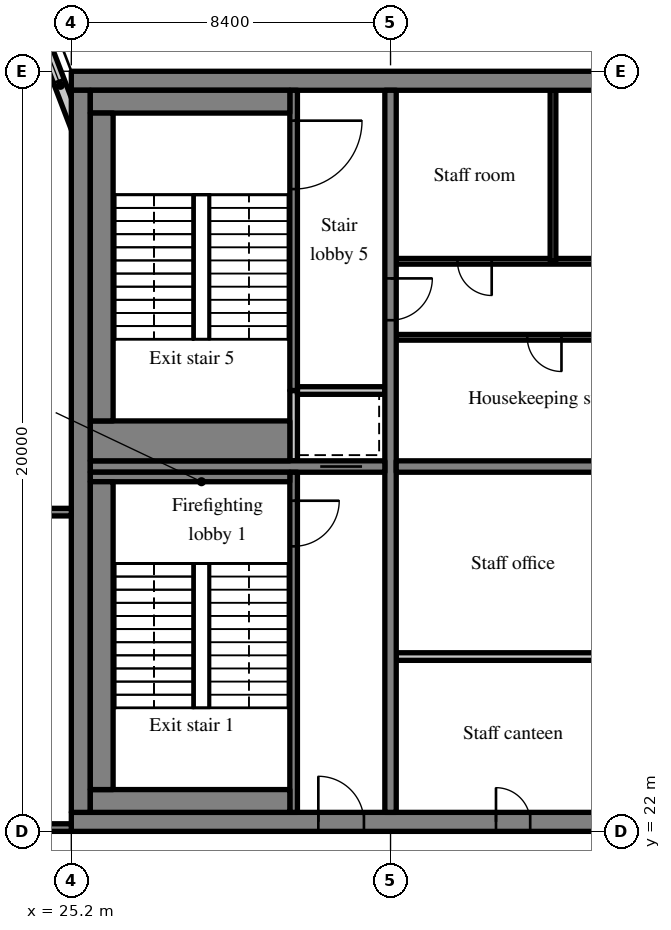
"""IFC4 building model, lengths in metres.
Left out: names, types, materials, properties, quantities, classifications, styles, units other than length and angle.
Written with IfcOpenShell. Run it as: python <this file> out.ifc"""

import sys

from ifc_helpers import new_model, si_unit, direction, frame, frame_2d, origin, place, context, subcontext, project, spatial, rectangle, extrude, source, transform, mapped, element, fill, save


model = new_model("IFC4")
c1 = context("Model", 3, precision=1e-05, world=origin(), true_north=direction((0.0, 1.0)))
c2 = subcontext(c1, "Body", "Model", "MODEL_VIEW")
j1 = project(units=[si_unit("LENGTHUNIT", "METRE"), si_unit("PLANEANGLEUNIT", "RADIAN")], contexts=[c1])
p1 = place(None, origin())
s1 = spatial("IfcSite", under=j1, at=p1, CompositionType="ELEMENT")
p2 = place(p1, origin())
s2 = spatial("IfcBuilding", under=s1, at=p2, CompositionType="ELEMENT")
p3 = place(p2, frame((0.0, 0.0, 301.7)))
s3 = spatial("IfcBuildingStorey", under=s2, at=p3, CompositionType="ELEMENT", Elevation=301.7)
m1 = source(origin(), c2, "Body", "SweptSolid", [
    extrude(rectangle(XDim=50.4, YDim=0.5, at=frame_2d((25.2, 0.0))), origin(), (0.0, 0.0, 1.0), 3.72),
])
p4 = place(p3, frame((25.2, 22.25, 0.0), z_axis=(0.0, 0.0, 1.0), x_axis=(1.0, 0.0, 0.0)))
e1 = element("IfcWall", 1, at=p4, inside=s3, PredefinedType="SHEAR", context=c2, shape_type="MappedRepresentation", body=[
    mapped(m1, transform((0.0, 0.0, 0.0), scale=1.0)),
])
m2 = source(origin(), c2, "Body", "SweptSolid", [
    extrude(rectangle(XDim=1.8, YDim=2.1, at=frame_2d((0.9, 1.05))), frame((0.0, 0.26, 0.0), z_axis=(0.0, -1.0, 0.0), x_axis=(1.0, 0.0, 0.0)), (0.0, 0.0, 1.0), 0.52),
])
p5 = place(p4, frame((15.9, 0.0, 0.0)))
e2 = element("IfcOpeningElement", 2, at=p5, cuts=e1, PredefinedType="OPENING", context=c2, shape_type="MappedRepresentation", body=[
    mapped(m2, transform((0.0, 0.0, 0.0), scale=1.0)),
])
m3 = source(origin(), c2, "Body", "SweptSolid", [
    extrude(rectangle(XDim=0.9, YDim=2.1, at=frame_2d((0.45, 1.05))), frame((0.0, 0.26, 0.0), z_axis=(0.0, -1.0, 0.0), x_axis=(1.0, 0.0, 0.0)), (0.0, 0.0, 1.0), 0.52),
])
p6 = place(p4, frame((11.175, 0.0, 0.0)))
e3 = element("IfcOpeningElement", 3, at=p6, cuts=e1, PredefinedType="OPENING", context=c2, shape_type="MappedRepresentation", body=[
    mapped(m3, transform((0.0, 0.0, 0.0), scale=1.0)),
])
p7 = place(p4, frame((21.525, 0.0, 0.0)))
e4 = element("IfcOpeningElement", 4, at=p7, cuts=e1, PredefinedType="OPENING", context=c2, shape_type="MappedRepresentation", body=[
    mapped(m3, transform((0.0, 0.0, 0.0), scale=1.0)),
])
p8 = place(p4, frame((32.7, 0.0, 0.0)))
e5 = element("IfcOpeningElement", 5, at=p8, cuts=e1, PredefinedType="OPENING", context=c2, shape_type="MappedRepresentation", body=[
    mapped(m2, transform((0.0, 0.0, 0.0), scale=1.0)),
])
m4 = source(origin(), c2, "Body", "SweptSolid", [
    extrude(rectangle(XDim=1.2, YDim=2.1, at=frame_2d((0.6, 1.05))), frame((0.0, 0.26, 0.0), z_axis=(0.0, -1.0, 0.0), x_axis=(1.0, 0.0, 0.0)), (0.0, 0.0, 1.0), 0.52),
])
p9 = place(p4, frame((6.5, 0.0, 0.0)))
e6 = element("IfcOpeningElement", 6, at=p9, cuts=e1, PredefinedType="OPENING", context=c2, shape_type="MappedRepresentation", body=[
    mapped(m4, transform((0.0, 0.0, 0.0), scale=1.0)),
])
p10 = place(p4, frame((47.975, 0.0, 0.0)))
e7 = element("IfcOpeningElement", 7, at=p10, cuts=e1, PredefinedType="OPENING", context=c2, shape_type="MappedRepresentation", body=[
    mapped(m4, transform((0.0, 0.0, 0.0), scale=1.0)),
])
p11 = place(p3, frame((25.2, 41.75, 0.0), z_axis=(0.0, 0.0, 1.0), x_axis=(1.0, 0.0, 0.0)))
e8 = element("IfcWall", 8, at=p11, inside=s3, PredefinedType="SHEAR", context=c2, shape_type="MappedRepresentation", body=[
    mapped(m1, transform((0.0, 0.0, 0.0), scale=1.0)),
])
m5 = source(origin(), c2, "Body", "SweptSolid", [
    extrude(rectangle(XDim=19.0, YDim=0.5, at=frame_2d((9.5, 0.0))), origin(), (0.0, 0.0, 1.0), 3.72),
])
p12 = place(p3, frame((25.45, 22.5, 0.0), z_axis=(0.0, 0.0, 1.0), x_axis=(0.0, 1.0, 0.0)))
e9 = element("IfcWall", 9, at=p12, inside=s3, PredefinedType="SHEAR", context=c2, shape_type="MappedRepresentation", body=[
    mapped(m5, transform((0.0, 0.0, 0.0), scale=1.0)),
])
m6 = source(origin(), c2, "Body", "SweptSolid", [
    extrude(rectangle(XDim=19.0, YDim=0.3, at=frame_2d((9.5, 0.0))), origin(), (0.0, 0.0, 1.0), 3.72),
])
p13 = place(p3, frame((33.6, 22.5, 0.0), z_axis=(0.0, 0.0, 1.0), x_axis=(0.0, 1.0, 0.0)))
e10 = element("IfcWall", 10, at=p13, inside=s3, PredefinedType="SHEAR", context=c2, shape_type="MappedRepresentation", body=[
    mapped(m6, transform((0.0, 0.0, 0.0), scale=1.0)),
])
m7 = source(origin(), c2, "Body", "SweptSolid", [
    extrude(rectangle(XDim=1.1, YDim=2.1, at=frame_2d((0.55, 1.05))), frame((0.0, 0.16, 0.0), z_axis=(0.0, -1.0, 0.0), x_axis=(1.0, 0.0, 0.0)), (0.0, 0.0, 1.0), 0.32),
])
p14 = place(p13, frame((12.95, 0.0, 0.0)))
e11 = element("IfcOpeningElement", 11, at=p14, cuts=e10, PredefinedType="OPENING", context=c2, shape_type="MappedRepresentation", body=[
    mapped(m7, transform((0.0, 0.0, 0.0), scale=1.0)),
])
m8 = source(origin(), c2, "Body", "SweptSolid", [
    extrude(rectangle(XDim=7.75, YDim=0.3, at=frame_2d((3.875, 0.0))), origin(), (0.0, 0.0, 1.0), 3.72),
])
p15 = place(p3, frame((25.7, 31.6, 0.0), z_axis=(0.0, 0.0, 1.0), x_axis=(1.0, 0.0, 0.0)))
e12 = element("IfcWall", 12, at=p15, inside=s3, PredefinedType="SHEAR", context=c2, shape_type="MappedRepresentation", body=[
    mapped(m8, transform((0.0, 0.0, 0.0), scale=1.0)),
])
p16 = place(p15, frame((6.05, 0.0, 0.0)))
e13 = element("IfcOpeningElement", 13, at=p16, cuts=e12, PredefinedType="OPENING", context=c2, shape_type="MappedRepresentation", body=[
    mapped(m7, transform((0.0, 0.0, 0.0), scale=1.0)),
])
m9 = source(origin(), c2, "Body", "SweptSolid", [
    extrude(rectangle(XDim=16.5, YDim=0.3, at=frame_2d((8.25, 0.0))), origin(), (0.0, 0.0, 1.0), 3.72),
])
p17 = place(p3, frame((33.75, 31.6, 0.0), z_axis=(0.0, 0.0, 1.0), x_axis=(1.0, 0.0, 0.0)))
e14 = element("IfcWall", 14, at=p17, inside=s3, PredefinedType="SHEAR", context=c2, shape_type="MappedRepresentation", body=[
    mapped(m9, transform((0.0, 0.0, 0.0), scale=1.0)),
])
m10 = source(origin(), c2, "Body", "SweptSolid", [
    extrude(rectangle(XDim=1.0, YDim=2.1, at=frame_2d((0.5, 1.05))), frame((0.0, 0.16, 0.0), z_axis=(0.0, -1.0, 0.0), x_axis=(1.0, 0.0, 0.0)), (0.0, 0.0, 1.0), 0.32),
])
p18 = place(p17, frame((14.875, 0.0, 0.0)))
e15 = element("IfcOpeningElement", 15, at=p18, cuts=e14, PredefinedType="OPENING", context=c2, shape_type="MappedRepresentation", body=[
    mapped(m10, transform((0.0, 0.0, 0.0), scale=1.0)),
])
m11 = source(origin(), c2, "Body", "SweptSolid", [
    extrude(rectangle(XDim=3.559, YDim=0.3, at=frame_2d((1.78, 0.0))), origin(), (0.0, 0.0, 1.0), 3.72),
])
p19 = place(p3, frame((25.55, 39.969, 0.0), z_axis=(0.0, 0.0, 1.0), x_axis=(-0.35779745313, 0.933799219604, 0.0)))
e16 = element("IfcWall", 16, at=p19, inside=s3, PredefinedType="SOLIDWALL", context=c2, shape_type="MappedRepresentation", body=[
    mapped(m11, transform((0.0, 0.0, 0.0), scale=1.0)),
])
m12 = source(origin(), c2, "Body", "SweptSolid", [
    extrude(rectangle(XDim=1.5, YDim=2.0, at=frame_2d((0.75, 1.0))), frame((0.0, 0.16, 0.0), z_axis=(0.0, -1.0, 0.0), x_axis=(1.0, 0.0, 0.0)), (0.0, 0.0, 1.0), 0.32),
])
p20 = place(p19, frame((1.903, 0.0, 0.9)))
e17 = element("IfcOpeningElement", 17, at=p20, cuts=e16, PredefinedType="OPENING", context=c2, shape_type="MappedRepresentation", body=[
    mapped(m12, transform((0.0, 0.0, 0.0), scale=1.0)),
])
m13 = source(origin(), c2, "Body", "SweptSolid", [
    extrude(rectangle(XDim=6.15, YDim=0.2, at=frame_2d((3.075, 0.0))), origin(), (0.0, 0.0, 1.0), 3.72),
])
p21 = place(p3, frame((33.75, 26.6, 0.0), z_axis=(0.0, 0.0, 1.0), x_axis=(1.0, 0.0, 0.0)))
e18 = element("IfcWall", 18, at=p21, inside=s3, PredefinedType="PARTITIONING", context=c2, shape_type="MappedRepresentation", body=[
    mapped(m13, transform((0.0, 0.0, 0.0), scale=1.0)),
])
m14 = source(origin(), c2, "Body", "SweptSolid", [
    extrude(rectangle(XDim=14.25, YDim=0.15, at=frame_2d((7.125, 0.0))), origin(), (0.0, 0.0, 1.0), 3.72),
])
p22 = place(p3, frame((33.75, 35.0, 0.0), z_axis=(0.0, 0.0, 1.0), x_axis=(1.0, 0.0, 0.0)))
e19 = element("IfcWall", 19, at=p22, inside=s3, PredefinedType="PARTITIONING", context=c2, shape_type="MappedRepresentation", body=[
    mapped(m14, transform((0.0, 0.0, 0.0), scale=1.0)),
])
m15 = source(origin(), c2, "Body", "SweptSolid", [
    extrude(rectangle(XDim=0.9, YDim=2.1, at=frame_2d((0.45, 1.05))), frame((0.0, 0.085, 0.0), z_axis=(0.0, -1.0, 0.0), x_axis=(1.0, 0.0, 0.0)), (0.0, 0.0, 1.0), 0.17),
])
p23 = place(p22, frame((3.448, 0.0, 0.0)))
e20 = element("IfcOpeningElement", 20, at=p23, cuts=e19, PredefinedType="OPENING", context=c2, shape_type="MappedRepresentation", body=[
    mapped(m15, transform((0.0, 0.0, 0.0), scale=1.0)),
])
p24 = place(p22, frame((10.536, 0.0, 0.0)))
e21 = element("IfcOpeningElement", 21, at=p24, cuts=e19, PredefinedType="OPENING", context=c2, shape_type="MappedRepresentation", body=[
    mapped(m15, transform((0.0, 0.0, 0.0), scale=1.0)),
])
m16 = source(origin(), c2, "Body", "SweptSolid", [
    extrude(rectangle(XDim=16.5, YDim=0.15, at=frame_2d((8.25, 0.0))), origin(), (0.0, 0.0, 1.0), 3.72),
])
p25 = place(p3, frame((33.75, 37.0, 0.0), z_axis=(0.0, 0.0, 1.0), x_axis=(1.0, 0.0, 0.0)))
e22 = element("IfcWall", 22, at=p25, inside=s3, PredefinedType="PARTITIONING", context=c2, shape_type="MappedRepresentation", body=[
    mapped(m16, transform((0.0, 0.0, 0.0), scale=1.0)),
])
p26 = place(p25, frame((1.612, 0.0, 0.0)))
e23 = element("IfcOpeningElement", 23, at=p26, cuts=e22, PredefinedType="OPENING", context=c2, shape_type="MappedRepresentation", body=[
    mapped(m15, transform((0.0, 0.0, 0.0), scale=1.0)),
])
p27 = place(p25, frame((7.387, 0.0, 0.0)))
e24 = element("IfcOpeningElement", 24, at=p27, cuts=e22, PredefinedType="OPENING", context=c2, shape_type="MappedRepresentation", body=[
    mapped(m15, transform((0.0, 0.0, 0.0), scale=1.0)),
])
p28 = place(p25, frame((12.337, 0.0, 0.0)))
e25 = element("IfcOpeningElement", 25, at=p28, cuts=e22, PredefinedType="OPENING", context=c2, shape_type="MappedRepresentation", body=[
    mapped(m15, transform((0.0, 0.0, 0.0), scale=1.0)),
])
p29 = place(p25, frame((14.813, 0.0, 0.0)))
e26 = element("IfcOpeningElement", 26, at=p29, cuts=e22, PredefinedType="OPENING", context=c2, shape_type="MappedRepresentation", body=[
    mapped(m15, transform((0.0, 0.0, 0.0), scale=1.0)),
])
m17 = source(origin(), c2, "Body", "SweptSolid", [
    extrude(rectangle(XDim=4.5, YDim=0.15, at=frame_2d((2.25, 0.0))), origin(), (0.0, 0.0, 1.0), 3.72),
])
p30 = place(p3, frame((37.875, 37.0, 0.0), z_axis=(0.0, 0.0, 1.0), x_axis=(0.0, 1.0, 0.0)))
e27 = element("IfcWall", 27, at=p30, inside=s3, PredefinedType="PARTITIONING", context=c2, shape_type="MappedRepresentation", body=[
    mapped(m17, transform((0.0, 0.0, 0.0), scale=1.0)),
])
m18 = source(origin(), c2, "Body", "SweptSolid", [
    extrude(rectangle(XDim=8.95, YDim=0.2, at=frame_2d((4.475, 0.0))), origin(), (0.0, 0.0, 1.0), 3.72),
])
p31 = place(p3, frame((31.05, 22.5, 0.0), z_axis=(0.0, 0.0, 1.0), x_axis=(0.0, 1.0, 0.0)))
e28 = element("IfcWall", 28, at=p31, inside=s3, PredefinedType="SOLIDWALL", context=c2, shape_type="MappedRepresentation", body=[
    mapped(m18, transform((0.0, 0.0, 0.0), scale=1.0)),
])
m19 = source(origin(), c2, "Body", "SweptSolid", [
    extrude(rectangle(XDim=1.2, YDim=2.1, at=frame_2d((0.6, 1.05))), frame((0.0, 0.11, 0.0), z_axis=(0.0, -1.0, 0.0), x_axis=(1.0, 0.0, 0.0)), (0.0, 0.0, 1.0), 0.22),
])
p32 = place(p31, frame((7.0, 0.0, 0.0)))
e29 = element("IfcOpeningElement", 29, at=p32, cuts=e28, PredefinedType="OPENING", context=c2, shape_type="MappedRepresentation", body=[
    mapped(m19, transform((0.0, 0.0, 0.0), scale=1.0)),
])
m20 = source(origin(), c2, "Body", "SweptSolid", [
    extrude(rectangle(XDim=1.85, YDim=0.2, at=frame_2d((0.925, 0.0))), origin(), (0.0, 0.0, 1.0), 3.72),
])
p33 = place(p3, frame((31.05, 31.75, 0.0), z_axis=(0.0, 0.0, 1.0), x_axis=(0.0, 1.0, 0.0)))
e30 = element("IfcWall", 30, at=p33, inside=s3, PredefinedType="SOLIDWALL", context=c2, shape_type="MappedRepresentation", body=[
    mapped(m20, transform((0.0, 0.0, 0.0), scale=1.0)),
])
m21 = source(origin(), c2, "Body", "SweptSolid", [
    extrude(rectangle(XDim=2.3, YDim=0.2, at=frame_2d((1.15, 0.0))), origin(), (0.0, 0.0, 1.0), 3.72),
])
p34 = place(p3, frame((31.15, 33.6, 0.0), z_axis=(0.0, 0.0, 1.0), x_axis=(1.0, 0.0, 0.0)))
e31 = element("IfcWall", 31, at=p34, inside=s3, PredefinedType="SOLIDWALL", context=c2, shape_type="MappedRepresentation", body=[
    mapped(m21, transform((0.0, 0.0, 0.0), scale=1.0)),
])
m22 = source(origin(), c2, "Body", "SweptSolid", [
    extrude(rectangle(XDim=7.9, YDim=0.2, at=frame_2d((3.95, 0.0))), origin(), (0.0, 0.0, 1.0), 3.72),
])
p35 = place(p3, frame((31.05, 33.6, 0.0), z_axis=(0.0, 0.0, 1.0), x_axis=(0.0, 1.0, 0.0)))
e32 = element("IfcWall", 32, at=p35, inside=s3, PredefinedType="SOLIDWALL", context=c2, shape_type="MappedRepresentation", body=[
    mapped(m22, transform((0.0, 0.0, 0.0), scale=1.0)),
])
m23 = source(origin(), c2, "Body", "SweptSolid", [
    extrude(rectangle(XDim=1.8, YDim=2.1, at=frame_2d((0.9, 1.05))), frame((0.0, 0.11, 0.0), z_axis=(0.0, -1.0, 0.0), x_axis=(1.0, 0.0, 0.0)), (0.0, 0.0, 1.0), 0.22),
])
p36 = place(p35, frame((5.3, 0.0, 0.0)))
e33 = element("IfcOpeningElement", 33, at=p36, cuts=e32, PredefinedType="OPENING", context=c2, shape_type="MappedRepresentation", body=[
    mapped(m23, transform((0.0, 0.0, 0.0), scale=1.0)),
])
m24 = source(origin(), c2, "Body", "SweptSolid", [
    extrude(rectangle(XDim=8.15, YDim=0.2, at=frame_2d((4.075, 0.0))), origin(), (0.0, 0.0, 1.0), 3.72),
])
p37 = place(p3, frame((17.05, 22.1, 0.0), z_axis=(0.0, 0.0, 1.0), x_axis=(1.0, 0.0, 0.0)))
e34 = element("IfcWall", 34, at=p37, inside=s3, PredefinedType="SOLIDWALL", context=c2, shape_type="MappedRepresentation", body=[
    mapped(m24, transform((0.0, 0.0, 0.0), scale=1.0)),
])
p38 = place(p37, frame((5.95, 0.0, 0.0)))
e35 = element("IfcOpeningElement", 35, at=p38, cuts=e34, PredefinedType="OPENING", context=c2, shape_type="MappedRepresentation", body=[
    mapped(m19, transform((0.0, 0.0, 0.0), scale=1.0)),
])
p39 = place(p3, frame((17.05, 30.4, 0.0), z_axis=(0.0, 0.0, 1.0), x_axis=(1.0, 0.0, 0.0)))
e36 = element("IfcWall", 36, at=p39, inside=s3, PredefinedType="SOLIDWALL", context=c2, shape_type="MappedRepresentation", body=[
    mapped(m24, transform((0.0, 0.0, 0.0), scale=1.0)),
])
m25 = source(origin(), c2, "Body", "SweptSolid", [
    extrude(rectangle(XDim=1.0, YDim=2.1, at=frame_2d((0.5, 1.05))), frame((0.0, 0.11, 0.0), z_axis=(0.0, -1.0, 0.0), x_axis=(1.0, 0.0, 0.0)), (0.0, 0.0, 1.0), 0.22),
])
p40 = place(p39, frame((6.05, 0.0, 0.0)))
e37 = element("IfcOpeningElement", 37, at=p40, cuts=e36, PredefinedType="OPENING", context=c2, shape_type="MappedRepresentation", body=[
    mapped(m25, transform((0.0, 0.0, 0.0), scale=1.0)),
])
m26 = source(origin(), c2, "Body", "SweptSolid", [
    extrude(rectangle(XDim=5.25, YDim=0.6, at=frame_2d((2.625, 0.0))), origin(), (0.0, 0.0, 1.0), 3.72),
])
p41 = place(p3, frame((25.7, 22.8, 0.0), z_axis=(0.0, 0.0, 1.0), x_axis=(1.0, 0.0, 0.0)))
e38 = element("IfcWall", 38, at=p41, inside=s3, PredefinedType="SOLIDWALL", context=c2, shape_type="MappedRepresentation", body=[
    mapped(m26, transform((0.0, 0.0, 0.0), scale=1.0)),
])
m27 = source(origin(), c2, "Body", "SweptSolid", [
    extrude(rectangle(XDim=5.25, YDim=0.25, at=frame_2d((2.625, 0.0))), origin(), (0.0, 0.0, 1.0), 3.72),
])
p42 = place(p3, frame((25.7, 31.325, 0.0), z_axis=(0.0, 0.0, 1.0), x_axis=(1.0, 0.0, 0.0)))
e39 = element("IfcWall", 39, at=p42, inside=s3, PredefinedType="SOLIDWALL", context=c2, shape_type="MappedRepresentation", body=[
    mapped(m27, transform((0.0, 0.0, 0.0), scale=1.0)),
])
m28 = source(origin(), c2, "Body", "SweptSolid", [
    extrude(rectangle(XDim=8.1, YDim=0.6, at=frame_2d((4.05, 0.0))), origin(), (0.0, 0.0, 1.0), 3.72),
])
p43 = place(p3, frame((26.0, 23.1, 0.0), z_axis=(0.0, 0.0, 1.0), x_axis=(0.0, 1.0, 0.0)))
e40 = element("IfcWall", 40, at=p43, inside=s3, PredefinedType="SOLIDWALL", context=c2, shape_type="MappedRepresentation", body=[
    mapped(m28, transform((0.0, 0.0, 0.0), scale=1.0)),
])
p44 = place(p3, frame((25.7, 41.2, 0.0), z_axis=(0.0, 0.0, 1.0), x_axis=(1.0, 0.0, 0.0)))
e41 = element("IfcWall", 41, at=p44, inside=s3, PredefinedType="SOLIDWALL", context=c2, shape_type="MappedRepresentation", body=[
    mapped(m26, transform((0.0, 0.0, 0.0), scale=1.0)),
])
m29 = source(origin(), c2, "Body", "SweptSolid", [
    extrude(rectangle(XDim=5.25, YDim=1.05, at=frame_2d((2.625, 0.0))), origin(), (0.0, 0.0, 1.0), 3.72),
])
p45 = place(p3, frame((25.7, 32.275, 0.0), z_axis=(0.0, 0.0, 1.0), x_axis=(1.0, 0.0, 0.0)))
e42 = element("IfcWall", 42, at=p45, inside=s3, PredefinedType="SOLIDWALL", context=c2, shape_type="MappedRepresentation", body=[
    mapped(m29, transform((0.0, 0.0, 0.0), scale=1.0)),
])
p46 = place(p3, frame((26.0, 32.8, 0.0), z_axis=(0.0, 0.0, 1.0), x_axis=(0.0, 1.0, 0.0)))
e43 = element("IfcWall", 43, at=p46, inside=s3, PredefinedType="SOLIDWALL", context=c2, shape_type="MappedRepresentation", body=[
    mapped(m28, transform((0.0, 0.0, 0.0), scale=1.0)),
])
m30 = source(origin(), c2, "Body", "SweptSolid", [
    extrude(rectangle(XDim=1.5, YDim=2.0, at=frame_2d((0.75, 1.0))), frame((0.0, 0.03, 0.0), z_axis=(0.0, -1.0, 0.0), x_axis=(1.0, 0.0, 0.0)), (0.0, 0.0, 1.0), 0.06),
])
p47 = place(p20, origin())
e44 = element("IfcWindow", 44, at=p47, inside=s3, PartitioningType="SINGLE_PANEL", PredefinedType="WINDOW", context=c2, shape_type="MappedRepresentation", body=[
    mapped(m30, transform((0.0, 0.0, 0.0), scale=1.0)),
])
fill(e17, e44)
m31 = source(origin(), c2, "Body", "SweptSolid", [
    extrude(rectangle(XDim=0.9, YDim=2.1, at=frame_2d((0.45, 1.05))), frame((0.0, 0.175, 0.0), z_axis=(0.0, -1.0, 0.0), x_axis=(1.0, 0.0, 0.0)), (0.0, 0.0, 1.0), 0.05),
])
p48 = place(p6, origin())
e45 = element("IfcDoor", 45, at=p48, inside=s3, OperationType="SINGLE_SWING_LEFT", PredefinedType="DOOR", context=c2, shape_type="MappedRepresentation", body=[
    mapped(m31, transform((0.0, 0.0, 0.0), scale=1.0)),
])
fill(e3, e45)
m32 = source(origin(), c2, "Body", "SweptSolid", [
    extrude(rectangle(XDim=0.9, YDim=2.1, at=frame_2d((0.45, 1.05))), frame((0.0, 0.025, 0.0), z_axis=(0.0, -1.0, 0.0), x_axis=(1.0, 0.0, 0.0)), (0.0, 0.0, 1.0), 0.05),
])
p49 = place(p23, origin())
e46 = element("IfcDoor", 46, at=p49, inside=s3, OperationType="SINGLE_SWING_RIGHT", PredefinedType="DOOR", context=c2, shape_type="MappedRepresentation", body=[
    mapped(m32, transform((0.0, 0.0, 0.0), scale=1.0)),
])
fill(e20, e46)
p50 = place(p26, origin())
e47 = element("IfcDoor", 47, at=p50, inside=s3, OperationType="SINGLE_SWING_RIGHT", PredefinedType="DOOR", context=c2, shape_type="MappedRepresentation", body=[
    mapped(m32, transform((0.0, 0.0, 0.0), scale=1.0)),
])
fill(e23, e47)
m33 = source(origin(), c2, "Body", "SweptSolid", [
    extrude(rectangle(XDim=1.2, YDim=2.1, at=frame_2d((0.6, 1.05))), frame((0.0, 0.025, 0.0), z_axis=(0.0, -1.0, 0.0), x_axis=(1.0, 0.0, 0.0)), (0.0, 0.0, 1.0), 0.05),
])
p51 = place(p32, origin())
e48 = element("IfcDoor", 48, at=p51, inside=s3, OperationType="SINGLE_SWING_RIGHT", PredefinedType="DOOR", context=c2, shape_type="MappedRepresentation", body=[
    mapped(m33, transform((0.0, 0.0, 0.0), scale=1.0)),
])
fill(e29, e48)
m34 = source(origin(), c2, "Body", "SweptSolid", [
    extrude(rectangle(XDim=1.2, YDim=2.1, at=frame_2d((0.6, 1.05))), frame((0.0, 0.175, 0.0), z_axis=(0.0, -1.0, 0.0), x_axis=(1.0, 0.0, 0.0)), (0.0, 0.0, 1.0), 0.05),
])
p52 = place(p9, origin())
e49 = element("IfcDoor", 49, at=p52, inside=s3, OperationType="SINGLE_SWING_LEFT", PredefinedType="DOOR", context=c2, shape_type="MappedRepresentation", body=[
    mapped(m34, transform((0.0, 0.0, 0.0), scale=1.0)),
])
fill(e6, e49)
m35 = source(origin(), c2, "Body", "SweptSolid", [
    extrude(rectangle(XDim=1.1, YDim=2.1, at=frame_2d((0.55, 1.05))), frame((0.0, 0.025, 0.0), z_axis=(0.0, -1.0, 0.0), x_axis=(1.0, 0.0, 0.0)), (0.0, 0.0, 1.0), 0.05),
])
p53 = place(p16, origin())
e50 = element("IfcDoor", 50, at=p53, inside=s3, OperationType="SLIDING_TO_LEFT", PredefinedType="DOOR", context=c2, shape_type="MappedRepresentation", body=[
    mapped(m35, transform((0.0, 0.0, 0.0), scale=1.0)),
])
fill(e13, e50)
m36 = source(origin(), c2, "Body", "SweptSolid", [
    extrude(rectangle(XDim=1.8, YDim=2.1, at=frame_2d((0.9, 1.05))), frame((0.0, 0.025, 0.0), z_axis=(0.0, -1.0, 0.0), x_axis=(1.0, 0.0, 0.0)), (0.0, 0.0, 1.0), 0.05),
])
p54 = place(p36, origin())
e51 = element("IfcDoor", 51, at=p54, inside=s3, OperationType="SINGLE_SWING_RIGHT", PredefinedType="DOOR", context=c2, shape_type="MappedRepresentation", body=[
    mapped(m36, transform((0.0, 0.0, 0.0), scale=1.0)),
])
fill(e33, e51)
p55 = place(p14, origin())
e52 = element("IfcDoor", 52, at=p55, inside=s3, OperationType="SINGLE_SWING_RIGHT", PredefinedType="DOOR", context=c2, shape_type="MappedRepresentation", body=[
    mapped(m35, transform((0.0, 0.0, 0.0), scale=1.0)),
])
fill(e11, e52)
save(model, sys.argv[1])
